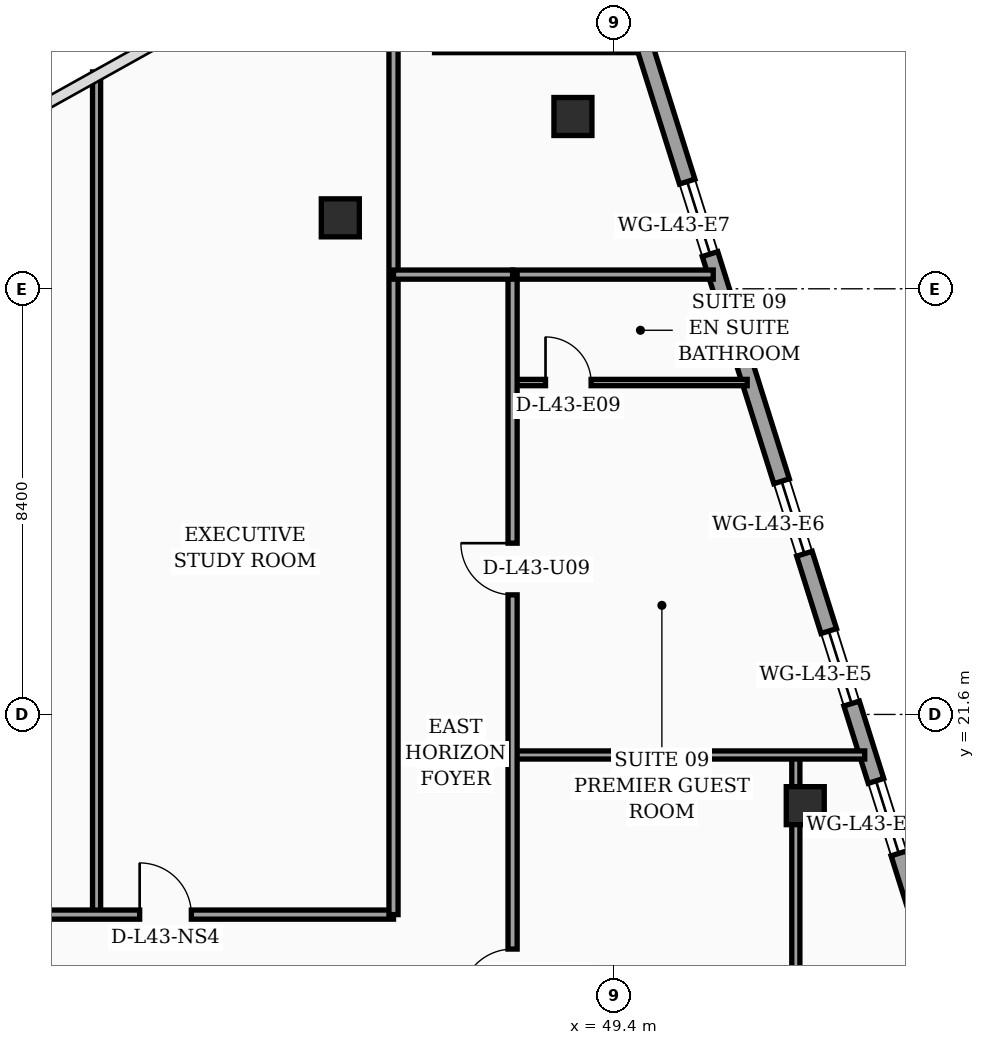
"""IFC4 building model, lengths in metres.
Left out: names, types, materials, properties, quantities, classifications, styles, units other than length and angle.
Written with IfcOpenShell. Run it as: python <this file> out.ifc"""

import sys

from ifc_helpers import new_model, si_unit, direction, frame, frame_2d, origin, origin_2d, place, context, subcontext, project, spatial, rectangle, hollow_rectangle, extrude, element, fill, save


model = new_model("IFC4")
c1 = context("Model", 3, precision=1e-05, world=origin(), true_north=direction((0.0, 1.0)))
c2 = subcontext(c1, "Body", "Model", "MODEL_VIEW")
j1 = project(units=[si_unit("LENGTHUNIT", "METRE"), si_unit("PLANEANGLEUNIT", "RADIAN")], contexts=[c1])
p1 = place(None, origin())
s1 = spatial("IfcSite", under=j1, at=p1, CompositionType="ELEMENT")
p2 = place(p1, origin())
s2 = spatial("IfcBuilding", under=s1, at=p2, CompositionType="ELEMENT")
p3 = place(p2, frame((0.0, 0.0, 175.1)))
s3 = spatial("IfcBuildingStorey", under=s2, at=p3, CompositionType="ELEMENT", Elevation=175.1)
for number, where, z_axis, x_axis in (
    (1, (44.0, 31.4, 0.0), (0.0, 0.0, 1.0), (1.0, 0.0, 0.0)),
    (2, (53.176, 19.8, 0.0), (0.0, 0.0, 1.0), (1.0, 0.0, 0.0)),
    (3, (48.591, 33.4, 0.0), (0.0, 0.0, 1.0), (1.0, 0.0, 0.0)),
):
    element("IfcColumn", number, at=place(p3, frame(where, z_axis=z_axis, x_axis=x_axis)), inside=s3, PredefinedType="COLUMN", context=c2, shape_type="SweptSolid", body=[
        extrude(hollow_rectangle(XDim=0.75, YDim=0.75, WallThickness=0.032, at=origin_2d()), origin(), (0.0, 0.0, 1.0), 3.56),
    ])
p4 = place(p3, frame((50.04, 34.8, 0.0), z_axis=(0.0, 0.0, 1.0), x_axis=(-1.0, 0.0, 0.0)))
e4 = element("IfcWall", 4, at=p4, inside=s3, PredefinedType="SOLIDWALL", context=c2, shape_type="SweptSolid", body=[
    extrude(rectangle(XDim=4.18, YDim=0.28, at=frame_2d((2.09, 0.0))), origin(), (0.0, 0.0, 1.0), 3.56),
])
p5 = place(p3, frame((59.23, 5.505, 0.0), z_axis=(0.0, 0.0, 1.0), x_axis=(-0.300509063924, 0.953778958931, 0.0)))
e5 = element("IfcWall", 5, at=p5, inside=s3, PredefinedType="SOLIDWALL", context=c2, shape_type="SweptSolid", body=[
    extrude(rectangle(XDim=30.814, YDim=0.32, at=frame_2d((15.407, 0.0))), origin(), (0.0, 0.0, 1.0), 3.56),
])
p6 = place(p5, frame((10.199, 0.0, 0.0)))
e6 = element("IfcOpeningElement", 6, at=p6, cuts=e5, PredefinedType="OPENING", context=c2, shape_type="SweptSolid", body=[
    extrude(rectangle(XDim=1.4, YDim=2.25, at=frame_2d((0.7, 1.125))), frame((0.0, 0.17, 0.0), z_axis=(0.0, -1.0, 0.0), x_axis=(1.0, 0.0, 0.0)), (0.0, 0.0, 1.0), 0.34),
])
p7 = place(p5, frame((2.65, 0.0, 0.75)))
e7 = element("IfcOpeningElement", 7, at=p7, cuts=e5, PredefinedType="OPENING", context=c2, shape_type="SweptSolid", body=[
    extrude(rectangle(XDim=1.5, YDim=1.6, at=frame_2d((0.75, 0.8))), frame((0.0, 0.17, 0.0), z_axis=(0.0, -1.0, 0.0), x_axis=(1.0, 0.0, 0.0)), (0.0, 0.0, 1.0), 0.34),
])
p8 = place(p5, frame((4.7, 0.0, 0.75)))
e8 = element("IfcOpeningElement", 8, at=p8, cuts=e5, PredefinedType="OPENING", context=c2, shape_type="SweptSolid", body=[
    extrude(rectangle(XDim=1.5, YDim=1.6, at=frame_2d((0.75, 0.8))), frame((0.0, 0.17, 0.0), z_axis=(0.0, -1.0, 0.0), x_axis=(1.0, 0.0, 0.0)), (0.0, 0.0, 1.0), 0.34),
])
p9 = place(p5, frame((7.8, 0.0, 0.75)))
e9 = element("IfcOpeningElement", 9, at=p9, cuts=e5, PredefinedType="OPENING", context=c2, shape_type="SweptSolid", body=[
    extrude(rectangle(XDim=1.5, YDim=1.6, at=frame_2d((0.75, 0.8))), frame((0.0, 0.17, 0.0), z_axis=(0.0, -1.0, 0.0), x_axis=(1.0, 0.0, 0.0)), (0.0, 0.0, 1.0), 0.34),
])
p10 = place(p5, frame((14.0, 0.0, 0.75)))
e10 = element("IfcOpeningElement", 10, at=p10, cuts=e5, PredefinedType="OPENING", context=c2, shape_type="SweptSolid", body=[
    extrude(rectangle(XDim=1.5, YDim=1.6, at=frame_2d((0.75, 0.8))), frame((0.0, 0.17, 0.0), z_axis=(0.0, -1.0, 0.0), x_axis=(1.0, 0.0, 0.0)), (0.0, 0.0, 1.0), 0.34),
])
p11 = place(p5, frame((17.1, 0.0, 0.75)))
e11 = element("IfcOpeningElement", 11, at=p11, cuts=e5, PredefinedType="OPENING", context=c2, shape_type="SweptSolid", body=[
    extrude(rectangle(XDim=1.5, YDim=1.6, at=frame_2d((0.75, 0.8))), frame((0.0, 0.17, 0.0), z_axis=(0.0, -1.0, 0.0), x_axis=(1.0, 0.0, 0.0)), (0.0, 0.0, 1.0), 0.34),
])
p12 = place(p5, frame((20.2, 0.0, 0.75)))
e12 = element("IfcOpeningElement", 12, at=p12, cuts=e5, PredefinedType="OPENING", context=c2, shape_type="SweptSolid", body=[
    extrude(rectangle(XDim=1.5, YDim=1.6, at=frame_2d((0.75, 0.8))), frame((0.0, 0.17, 0.0), z_axis=(0.0, -1.0, 0.0), x_axis=(1.0, 0.0, 0.0)), (0.0, 0.0, 1.0), 0.34),
])
p13 = place(p5, frame((26.4, 0.0, 0.75)))
e13 = element("IfcOpeningElement", 13, at=p13, cuts=e5, PredefinedType="OPENING", context=c2, shape_type="SweptSolid", body=[
    extrude(rectangle(XDim=1.5, YDim=1.6, at=frame_2d((0.75, 0.8))), frame((0.0, 0.17, 0.0), z_axis=(0.0, -1.0, 0.0), x_axis=(1.0, 0.0, 0.0)), (0.0, 0.0, 1.0), 0.34),
])
p14 = place(p3, frame((39.19, 17.65, 0.0), z_axis=(0.0, 0.0, 1.0), x_axis=(0.0, 1.0, 0.0)))
e14 = element("IfcWall", 14, at=p14, inside=s3, PredefinedType="PARTITIONING", context=c2, shape_type="SweptSolid", body=[
    extrude(rectangle(XDim=16.63, YDim=0.16, at=frame_2d((8.315, 0.0))), origin(), (0.0, 0.0, 1.0), 2.94),
])
p15 = place(p3, frame((21.5, 17.65, 0.0), z_axis=(0.0, 0.0, 1.0), x_axis=(1.0, 0.0, 0.0)))
e15 = element("IfcWall", 15, at=p15, inside=s3, PredefinedType="PARTITIONING", context=c2, shape_type="SweptSolid", body=[
    extrude(rectangle(XDim=23.55, YDim=0.18, at=frame_2d((11.775, 0.0))), origin(), (0.0, 0.0, 1.0), 2.94),
])
p16 = place(p15, frame((0.95, 0.0, 0.0)))
e16 = element("IfcOpeningElement", 16, at=p16, cuts=e15, PredefinedType="OPENING", context=c2, shape_type="SweptSolid", body=[
    extrude(rectangle(XDim=1.02, YDim=2.2, at=frame_2d((0.51, 1.1))), frame((0.0, 0.1, 0.0), z_axis=(0.0, -1.0, 0.0), x_axis=(1.0, 0.0, 0.0)), (0.0, 0.0, 1.0), 0.2),
])
p17 = place(p15, frame((7.46, 0.0, 0.0)))
e17 = element("IfcOpeningElement", 17, at=p17, cuts=e15, PredefinedType="OPENING", context=c2, shape_type="SweptSolid", body=[
    extrude(rectangle(XDim=1.02, YDim=2.2, at=frame_2d((0.51, 1.1))), frame((0.0, 0.1, 0.0), z_axis=(0.0, -1.0, 0.0), x_axis=(1.0, 0.0, 0.0)), (0.0, 0.0, 1.0), 0.2),
])
p18 = place(p15, frame((12.68, 0.0, 0.0)))
e18 = element("IfcOpeningElement", 18, at=p18, cuts=e15, PredefinedType="OPENING", context=c2, shape_type="SweptSolid", body=[
    extrude(rectangle(XDim=1.02, YDim=2.2, at=frame_2d((0.51, 1.1))), frame((0.0, 0.1, 0.0), z_axis=(0.0, -1.0, 0.0), x_axis=(1.0, 0.0, 0.0)), (0.0, 0.0, 1.0), 0.2),
])
p19 = place(p15, frame((18.54, 0.0, 0.0)))
e19 = element("IfcOpeningElement", 19, at=p19, cuts=e15, PredefinedType="OPENING", context=c2, shape_type="SweptSolid", body=[
    extrude(rectangle(XDim=1.02, YDim=2.2, at=frame_2d((0.51, 1.1))), frame((0.0, 0.1, 0.0), z_axis=(0.0, -1.0, 0.0), x_axis=(1.0, 0.0, 0.0)), (0.0, 0.0, 1.0), 0.2),
])
p20 = place(p3, frame((45.05, 17.65, 0.0), z_axis=(0.0, 0.0, 1.0), x_axis=(0.0, 1.0, 0.0)))
e20 = element("IfcWall", 20, at=p20, inside=s3, PredefinedType="PARTITIONING", context=c2, shape_type="SweptSolid", body=[
    extrude(rectangle(XDim=19.9, YDim=0.18, at=frame_2d((9.95, 0.0))), origin(), (0.0, 0.0, 1.0), 2.94),
])
p21 = place(p3, frame((52.99, 7.45, 0.0), z_axis=(0.0, 0.0, 1.0), x_axis=(0.0, 1.0, 0.0)))
e21 = element("IfcWall", 21, at=p21, inside=s3, PredefinedType="PARTITIONING", context=c2, shape_type="SweptSolid", body=[
    extrude(rectangle(XDim=13.35, YDim=0.16, at=frame_2d((6.675, 0.0))), origin(), (0.0, 0.0, 1.0), 2.94),
])
p22 = place(p21, frame((6.2, 0.0, 0.0)))
e22 = element("IfcOpeningElement", 22, at=p22, cuts=e21, PredefinedType="OPENING", context=c2, shape_type="SweptSolid", body=[
    extrude(rectangle(XDim=0.96, YDim=2.2, at=frame_2d((0.48, 1.1))), frame((0.0, 0.09, 0.0), z_axis=(0.0, -1.0, 0.0), x_axis=(1.0, 0.0, 0.0)), (0.0, 0.0, 1.0), 0.18),
])
p23 = place(p3, frame((47.4, 28.15, 0.0), z_axis=(0.0, 0.0, 1.0), x_axis=(1.0, 0.0, 0.0)))
e23 = element("IfcWall", 23, at=p23, inside=s3, PredefinedType="PARTITIONING", context=c2, shape_type="SweptSolid", body=[
    extrude(rectangle(XDim=4.63, YDim=0.125, at=frame_2d((2.315, 0.0))), origin(), (0.0, 0.0, 1.0), 3.04),
])
p24 = place(p23, frame((0.65, 0.0, 0.0)))
e24 = element("IfcOpeningElement", 24, at=p24, cuts=e23, PredefinedType="OPENING", context=c2, shape_type="SweptSolid", body=[
    extrude(rectangle(XDim=0.9, YDim=2.15, at=frame_2d((0.45, 1.075))), frame((0.0, 0.073, 0.0), z_axis=(0.0, -1.0, 0.0), x_axis=(1.0, 0.0, 0.0)), (0.0, 0.0, 1.0), 0.145),
])
p25 = place(p3, frame((47.4, 20.8, 0.0), z_axis=(0.0, 0.0, 1.0), x_axis=(1.0, 0.0, 0.0)))
e25 = element("IfcWall", 25, at=p25, inside=s3, PredefinedType="PARTITIONING", context=c2, shape_type="SweptSolid", body=[
    extrude(rectangle(XDim=6.95, YDim=0.16, at=frame_2d((3.475, 0.0))), origin(), (0.0, 0.0, 1.0), 3.04),
])
p26 = place(p3, frame((47.4, 30.28, 0.0), z_axis=(0.0, 0.0, 1.0), x_axis=(1.0, 0.0, 0.0)))
e26 = element("IfcWall", 26, at=p26, inside=s3, PredefinedType="PARTITIONING", context=c2, shape_type="SweptSolid", body=[
    extrude(rectangle(XDim=3.96, YDim=0.18, at=frame_2d((1.98, 0.0))), origin(), (0.0, 0.0, 1.0), 3.04),
])
p27 = place(p3, frame((47.4, 2.44, 0.0), z_axis=(0.0, 0.0, 1.0), x_axis=(0.0, 1.0, 0.0)))
e27 = element("IfcWall", 27, at=p27, inside=s3, PredefinedType="PARTITIONING", context=c2, shape_type="SweptSolid", body=[
    extrude(rectangle(XDim=27.84, YDim=0.18, at=frame_2d((13.92, 0.0))), origin(), (0.0, 0.0, 1.0), 2.94),
])
p28 = place(p27, frame((13.51, 0.0, 0.0)))
e28 = element("IfcOpeningElement", 28, at=p28, cuts=e27, PredefinedType="OPENING", context=c2, shape_type="SweptSolid", body=[
    extrude(rectangle(XDim=1.02, YDim=2.2, at=frame_2d((0.51, 1.1))), frame((0.0, 0.1, 0.0), z_axis=(0.0, -1.0, 0.0), x_axis=(1.0, 0.0, 0.0)), (0.0, 0.0, 1.0), 0.2),
])
p29 = place(p27, frame((21.52, 0.0, 0.0)))
e29 = element("IfcOpeningElement", 29, at=p29, cuts=e27, PredefinedType="OPENING", context=c2, shape_type="SweptSolid", body=[
    extrude(rectangle(XDim=1.02, YDim=2.2, at=frame_2d((0.51, 1.1))), frame((0.0, 0.1, 0.0), z_axis=(0.0, -1.0, 0.0), x_axis=(1.0, 0.0, 0.0)), (0.0, 0.0, 1.0), 0.2),
])
p30 = place(p3, frame((45.05, 30.28, 0.0), z_axis=(0.0, 0.0, 1.0), x_axis=(1.0, 0.0, 0.0)))
e30 = element("IfcWall", 30, at=p30, inside=s3, PredefinedType="PARTITIONING", context=c2, shape_type="SweptSolid", body=[
    extrude(rectangle(XDim=2.35, YDim=0.18, at=frame_2d((1.175, 0.0))), origin(), (0.0, 0.0, 1.0), 2.94),
])
p31 = place(p10, origin())
e31 = element("IfcWindow", 31, at=p31, inside=s3, PartitioningType="SINGLE_PANEL", PredefinedType="WINDOW", context=c2, shape_type="SweptSolid", body=[
    extrude(rectangle(XDim=1.5, YDim=1.6, at=frame_2d((0.75, 0.8))), frame((0.0, 0.03, 0.0), z_axis=(0.0, -1.0, 0.0), x_axis=(1.0, 0.0, 0.0)), (0.0, 0.0, 1.0), 0.06),
])
fill(e10, e31)
p32 = place(p11, origin())
e32 = element("IfcWindow", 32, at=p32, inside=s3, PartitioningType="SINGLE_PANEL", PredefinedType="WINDOW", context=c2, shape_type="SweptSolid", body=[
    extrude(rectangle(XDim=1.5, YDim=1.6, at=frame_2d((0.75, 0.8))), frame((0.0, 0.03, 0.0), z_axis=(0.0, -1.0, 0.0), x_axis=(1.0, 0.0, 0.0)), (0.0, 0.0, 1.0), 0.06),
])
fill(e11, e32)
p33 = place(p12, origin())
e33 = element("IfcWindow", 33, at=p33, inside=s3, PartitioningType="SINGLE_PANEL", PredefinedType="WINDOW", context=c2, shape_type="SweptSolid", body=[
    extrude(rectangle(XDim=1.5, YDim=1.6, at=frame_2d((0.75, 0.8))), frame((0.0, 0.03, 0.0), z_axis=(0.0, -1.0, 0.0), x_axis=(1.0, 0.0, 0.0)), (0.0, 0.0, 1.0), 0.06),
])
fill(e12, e33)
p34 = place(p13, origin())
e34 = element("IfcWindow", 34, at=p34, inside=s3, PartitioningType="SINGLE_PANEL", PredefinedType="WINDOW", context=c2, shape_type="SweptSolid", body=[
    extrude(rectangle(XDim=1.5, YDim=1.6, at=frame_2d((0.75, 0.8))), frame((0.0, 0.03, 0.0), z_axis=(0.0, -1.0, 0.0), x_axis=(1.0, 0.0, 0.0)), (0.0, 0.0, 1.0), 0.06),
])
fill(e13, e34)
p35 = place(p19, origin())
e35 = element("IfcDoor", 35, at=p35, inside=s3, OperationType="SINGLE_SWING_LEFT", PredefinedType="DOOR", context=c2, shape_type="SweptSolid", body=[
    extrude(rectangle(XDim=1.02, YDim=2.2, at=frame_2d((0.51, 1.1))), frame((0.0, 0.025, 0.0), z_axis=(0.0, -1.0, 0.0), x_axis=(1.0, 0.0, 0.0)), (0.0, 0.0, 1.0), 0.05),
])
fill(e19, e35)
p36 = place(p24, origin())
e36 = element("IfcDoor", 36, at=p36, inside=s3, OperationType="SINGLE_SWING_LEFT", PredefinedType="DOOR", context=c2, shape_type="SweptSolid", body=[
    extrude(rectangle(XDim=0.9, YDim=2.15, at=frame_2d((0.45, 1.075))), frame((0.0, 0.025, 0.0), z_axis=(0.0, -1.0, 0.0), x_axis=(1.0, 0.0, 0.0)), (0.0, 0.0, 1.0), 0.05),
])
fill(e24, e36)
p37 = place(p28, origin())
e37 = element("IfcDoor", 37, at=p37, inside=s3, OperationType="SINGLE_SWING_LEFT", PredefinedType="DOOR", context=c2, shape_type="SweptSolid", body=[
    extrude(rectangle(XDim=1.02, YDim=2.2, at=frame_2d((0.51, 1.1))), frame((0.0, 0.025, 0.0), z_axis=(0.0, -1.0, 0.0), x_axis=(1.0, 0.0, 0.0)), (0.0, 0.0, 1.0), 0.05),
])
fill(e28, e37)
p38 = place(p29, origin())
e38 = element("IfcDoor", 38, at=p38, inside=s3, OperationType="SINGLE_SWING_RIGHT", PredefinedType="DOOR", context=c2, shape_type="SweptSolid", body=[
    extrude(rectangle(XDim=1.02, YDim=2.2, at=frame_2d((0.51, 1.1))), frame((0.0, 0.025, 0.0), z_axis=(0.0, -1.0, 0.0), x_axis=(1.0, 0.0, 0.0)), (0.0, 0.0, 1.0), 0.05),
])
fill(e29, e38)
save(model, sys.argv[1])
